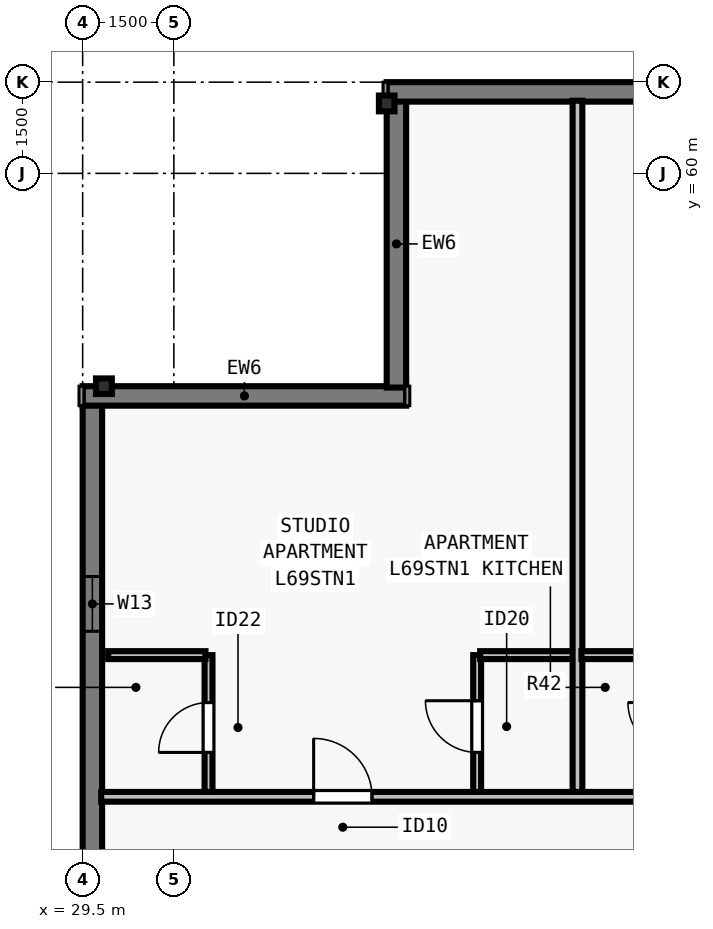
"""IFC4 building model, lengths in metres.
Left out: names, types, materials, properties, quantities, classifications, styles, units other than length and angle.
Written with IfcOpenShell. Run it as: python <this file> out.ifc"""

import sys

from ifc_helpers import new_model, si_unit, direction, frame, frame_2d, origin, origin_2d, place, context, subcontext, project, spatial, rectangle, i_section, extrude, element, fill, save


model = new_model("IFC4")
c1 = context("Model", 3, precision=1e-05, world=origin(), true_north=direction((0.0, 1.0)))
c2 = subcontext(c1, "Body", "Model", "MODEL_VIEW")
j1 = project(units=[si_unit("LENGTHUNIT", "METRE"), si_unit("PLANEANGLEUNIT", "RADIAN")], contexts=[c1])
p1 = place(None, origin())
s1 = spatial("IfcSite", under=j1, at=p1, CompositionType="ELEMENT")
p2 = place(p1, origin())
s2 = spatial("IfcBuilding", under=s1, at=p2, CompositionType="ELEMENT")
p3 = place(p2, frame((0.0, 0.0, 251.5)))
s3 = spatial("IfcBuildingStorey", under=s2, at=p3, CompositionType="ELEMENT", Elevation=251.5)
for number, where, z_axis, x_axis in (
    (1, (34.5, 61.15, 0.0), (0.0, 0.0, 1.0), (1.0, 0.0, 0.0)),
    (2, (29.85, 56.5, 0.0), (0.0, 0.0, 1.0), (0.0, 1.0, 0.0)),
):
    element("IfcColumn", number, at=place(p3, frame(where, z_axis=z_axis, x_axis=x_axis)), inside=s3, PredefinedType="COLUMN", context=c2, shape_type="SweptSolid", body=[
        extrude(i_section(OverallWidth=0.256, OverallDepth=0.26, WebThickness=0.01, FlangeThickness=0.017, FilletRadius=0.013, at=origin_2d()), origin(), (0.0, 0.0, 1.0), 3.5),
    ])
p4 = place(p3, frame((29.66, 32.8, 0.0), z_axis=(0.0, 0.0, 1.0), x_axis=(0.0, 1.0, 0.0)))
e3 = element("IfcWall", 3, at=p4, inside=s3, PredefinedType="SOLIDWALL", context=c2, shape_type="SweptSolid", body=[
    extrude(rectangle(XDim=23.402, YDim=0.32, at=frame_2d((11.701, 0.0))), origin(), (0.0, 0.0, 1.0), 3.29),
])
p5 = place(p4, frame((2.155, 0.0, 0.8)))
e4 = element("IfcOpeningElement", 4, at=p5, cuts=e3, PredefinedType="OPENING", context=c2, shape_type="SweptSolid", body=[
    extrude(rectangle(XDim=1.85, YDim=1.678, at=frame_2d((0.925, 0.839))), frame((0.0, 0.17, 0.0), z_axis=(0.0, -1.0, 0.0), x_axis=(1.0, 0.0, 0.0)), (0.0, 0.0, 1.0), 0.34),
])
p6 = place(p4, frame((5.966, 0.0, 0.8)))
e5 = element("IfcOpeningElement", 5, at=p6, cuts=e3, PredefinedType="OPENING", context=c2, shape_type="SweptSolid", body=[
    extrude(rectangle(XDim=1.55, YDim=1.678, at=frame_2d((0.775, 0.839))), frame((0.0, 0.17, 0.0), z_axis=(0.0, -1.0, 0.0), x_axis=(1.0, 0.0, 0.0)), (0.0, 0.0, 1.0), 0.34),
])
p7 = place(p4, frame((12.836, 0.0, 0.8)))
e6 = element("IfcOpeningElement", 6, at=p7, cuts=e3, PredefinedType="OPENING", context=c2, shape_type="SweptSolid", body=[
    extrude(rectangle(XDim=1.55, YDim=1.678, at=frame_2d((0.775, 0.839))), frame((0.0, 0.17, 0.0), z_axis=(0.0, -1.0, 0.0), x_axis=(1.0, 0.0, 0.0)), (0.0, 0.0, 1.0), 0.34),
])
p8 = place(p4, frame((19.67, 0.0, 0.8)))
e7 = element("IfcOpeningElement", 7, at=p8, cuts=e3, PredefinedType="OPENING", context=c2, shape_type="SweptSolid", body=[
    extrude(rectangle(XDim=0.9, YDim=1.678, at=frame_2d((0.45, 0.839))), frame((0.0, 0.17, 0.0), z_axis=(0.0, -1.0, 0.0), x_axis=(1.0, 0.0, 0.0)), (0.0, 0.0, 1.0), 0.34),
])
p9 = place(p3, frame((29.5, 56.34, 0.0), z_axis=(0.0, 0.0, 1.0), x_axis=(1.0, 0.0, 0.0)))
e8 = element("IfcWall", 8, at=p9, inside=s3, PredefinedType="SOLIDWALL", context=c2, shape_type="SweptSolid", body=[
    extrude(rectangle(XDim=5.32, YDim=0.32, at=frame_2d((2.66, 0.0))), origin(), (0.0, 0.0, 1.0), 3.29),
])
p10 = place(p3, frame((34.66, 56.478, 0.0), z_axis=(0.0, 0.0, 1.0), x_axis=(0.0, 1.0, 0.0)))
e9 = element("IfcWall", 9, at=p10, inside=s3, PredefinedType="SOLIDWALL", context=c2, shape_type="SweptSolid", body=[
    extrude(rectangle(XDim=4.724, YDim=0.32, at=frame_2d((2.362, 0.0))), origin(), (0.0, 0.0, 1.0), 3.29),
])
p11 = place(p3, frame((34.5, 61.34, 0.0), z_axis=(0.0, 0.0, 1.0), x_axis=(1.0, 0.0, 0.0)))
e10 = element("IfcWall", 10, at=p11, inside=s3, PredefinedType="SOLIDWALL", context=c2, shape_type="SweptSolid", body=[
    extrude(rectangle(XDim=34.702, YDim=0.32, at=frame_2d((17.351, 0.0))), origin(), (0.0, 0.0, 1.0), 3.29),
])
p12 = place(p11, frame((4.613, 0.0, 0.8)))
e11 = element("IfcOpeningElement", 11, at=p12, cuts=e10, PredefinedType="OPENING", context=c2, shape_type="SweptSolid", body=[
    extrude(rectangle(XDim=1.85, YDim=1.678, at=frame_2d((0.925, 0.839))), frame((0.0, 0.17, 0.0), z_axis=(0.0, -1.0, 0.0), x_axis=(1.0, 0.0, 0.0)), (0.0, 0.0, 1.0), 0.34),
])
p13 = place(p11, frame((7.688, 0.0, 0.8)))
e12 = element("IfcOpeningElement", 12, at=p13, cuts=e10, PredefinedType="OPENING", context=c2, shape_type="SweptSolid", body=[
    extrude(rectangle(XDim=1.55, YDim=1.678, at=frame_2d((0.775, 0.839))), frame((0.0, 0.17, 0.0), z_axis=(0.0, -1.0, 0.0), x_axis=(1.0, 0.0, 0.0)), (0.0, 0.0, 1.0), 0.34),
])
p14 = place(p11, frame((14.888, 0.0, 0.8)))
e13 = element("IfcOpeningElement", 13, at=p14, cuts=e10, PredefinedType="OPENING", context=c2, shape_type="SweptSolid", body=[
    extrude(rectangle(XDim=1.55, YDim=1.678, at=frame_2d((0.775, 0.839))), frame((0.0, 0.17, 0.0), z_axis=(0.0, -1.0, 0.0), x_axis=(1.0, 0.0, 0.0)), (0.0, 0.0, 1.0), 0.34),
])
p15 = place(p11, frame((18.564, 0.0, 0.8)))
e14 = element("IfcOpeningElement", 14, at=p15, cuts=e10, PredefinedType="OPENING", context=c2, shape_type="SweptSolid", body=[
    extrude(rectangle(XDim=1.85, YDim=1.678, at=frame_2d((0.925, 0.839))), frame((0.0, 0.17, 0.0), z_axis=(0.0, -1.0, 0.0), x_axis=(1.0, 0.0, 0.0)), (0.0, 0.0, 1.0), 0.34),
])
p16 = place(p11, frame((25.314, 0.0, 0.8)))
e15 = element("IfcOpeningElement", 15, at=p16, cuts=e10, PredefinedType="OPENING", context=c2, shape_type="SweptSolid", body=[
    extrude(rectangle(XDim=1.85, YDim=1.678, at=frame_2d((0.925, 0.839))), frame((0.0, 0.17, 0.0), z_axis=(0.0, -1.0, 0.0), x_axis=(1.0, 0.0, 0.0)), (0.0, 0.0, 1.0), 0.34),
])
p17 = place(p11, frame((28.389, 0.0, 0.8)))
e16 = element("IfcOpeningElement", 16, at=p17, cuts=e10, PredefinedType="OPENING", context=c2, shape_type="SweptSolid", body=[
    extrude(rectangle(XDim=1.55, YDim=1.678, at=frame_2d((0.775, 0.839))), frame((0.0, 0.17, 0.0), z_axis=(0.0, -1.0, 0.0), x_axis=(1.0, 0.0, 0.0)), (0.0, 0.0, 1.0), 0.34),
])
p18 = place(p3, frame((29.805, 49.748, 0.0), z_axis=(0.0, 0.0, 1.0), x_axis=(1.0, 0.0, 0.0)))
e17 = element("IfcWall", 17, at=p18, inside=s3, PredefinedType="PARTITIONING", context=c2, shape_type="SweptSolid", body=[
    extrude(rectangle(XDim=44.39, YDim=0.16, at=frame_2d((22.195, 0.0))), origin(), (0.0, 0.0, 1.0), 2.958),
])
p19 = place(p18, frame((3.494, 0.0, 0.0)))
e18 = element("IfcOpeningElement", 18, at=p19, cuts=e17, PredefinedType="OPENING", context=c2, shape_type="SweptSolid", body=[
    extrude(rectangle(XDim=0.96, YDim=2.18, at=frame_2d((0.48, 1.09))), frame((0.0, 0.09, 0.0), z_axis=(0.0, -1.0, 0.0), x_axis=(1.0, 0.0, 0.0)), (0.0, 0.0, 1.0), 0.18),
])
p20 = place(p18, frame((10.73, 0.0, 0.0)))
e19 = element("IfcOpeningElement", 19, at=p20, cuts=e17, PredefinedType="OPENING", context=c2, shape_type="SweptSolid", body=[
    extrude(rectangle(XDim=0.96, YDim=2.18, at=frame_2d((0.48, 1.09))), frame((0.0, 0.09, 0.0), z_axis=(0.0, -1.0, 0.0), x_axis=(1.0, 0.0, 0.0)), (0.0, 0.0, 1.0), 0.18),
])
p21 = place(p18, frame((18.09, 0.0, 0.0)))
e20 = element("IfcOpeningElement", 20, at=p21, cuts=e17, PredefinedType="OPENING", context=c2, shape_type="SweptSolid", body=[
    extrude(rectangle(XDim=0.96, YDim=2.18, at=frame_2d((0.48, 1.09))), frame((0.0, 0.09, 0.0), z_axis=(0.0, -1.0, 0.0), x_axis=(1.0, 0.0, 0.0)), (0.0, 0.0, 1.0), 0.18),
])
p22 = place(p18, frame((25.45, 0.0, 0.0)))
e21 = element("IfcOpeningElement", 21, at=p22, cuts=e17, PredefinedType="OPENING", context=c2, shape_type="SweptSolid", body=[
    extrude(rectangle(XDim=0.96, YDim=2.18, at=frame_2d((0.48, 1.09))), frame((0.0, 0.09, 0.0), z_axis=(0.0, -1.0, 0.0), x_axis=(1.0, 0.0, 0.0)), (0.0, 0.0, 1.0), 0.18),
])
p23 = place(p18, frame((32.81, 0.0, 0.0)))
e22 = element("IfcOpeningElement", 22, at=p23, cuts=e17, PredefinedType="OPENING", context=c2, shape_type="SweptSolid", body=[
    extrude(rectangle(XDim=0.96, YDim=2.18, at=frame_2d((0.48, 1.09))), frame((0.0, 0.09, 0.0), z_axis=(0.0, -1.0, 0.0), x_axis=(1.0, 0.0, 0.0)), (0.0, 0.0, 1.0), 0.18),
])
p24 = place(p18, frame((40.294, 0.0, 0.0)))
e23 = element("IfcOpeningElement", 23, at=p24, cuts=e17, PredefinedType="OPENING", context=c2, shape_type="SweptSolid", body=[
    extrude(rectangle(XDim=0.96, YDim=2.18, at=frame_2d((0.48, 1.09))), frame((0.0, 0.09, 0.0), z_axis=(0.0, -1.0, 0.0), x_axis=(1.0, 0.0, 0.0)), (0.0, 0.0, 1.0), 0.18),
])
p25 = place(p3, frame((31.57, 49.827, 0.0), z_axis=(0.0, 0.0, 1.0), x_axis=(0.0, 1.0, 0.0)))
e24 = element("IfcWall", 24, at=p25, inside=s3, PredefinedType="PLUMBINGWALL", context=c2, shape_type="SweptSolid", body=[
    extrude(rectangle(XDim=2.25, YDim=0.13, at=frame_2d((1.125, 0.0))), origin(), (0.0, 0.0, 1.0), 3.29),
])
p26 = place(p25, frame((0.65, 0.0, 0.0)))
e25 = element("IfcOpeningElement", 25, at=p26, cuts=e24, PredefinedType="OPENING", context=c2, shape_type="SweptSolid", body=[
    extrude(rectangle(XDim=0.82, YDim=2.1, at=frame_2d((0.41, 1.05))), frame((0.0, 0.075, 0.0), z_axis=(0.0, -1.0, 0.0), x_axis=(1.0, 0.0, 0.0)), (0.0, 0.0, 1.0), 0.15),
])
p27 = place(p3, frame((29.92, 52.077, 0.0), z_axis=(0.0, 0.0, 1.0), x_axis=(1.0, 0.0, 0.0)))
e26 = element("IfcWall", 26, at=p27, inside=s3, PredefinedType="PLUMBINGWALL", context=c2, shape_type="SweptSolid", body=[
    extrude(rectangle(XDim=1.6, YDim=0.13, at=frame_2d((0.8, 0.0))), origin(), (0.0, 0.0, 1.0), 3.29),
])
p28 = place(p3, frame((35.988, 49.827, 0.0), z_axis=(0.0, 0.0, 1.0), x_axis=(0.0, 1.0, 0.0)))
e27 = element("IfcWall", 27, at=p28, inside=s3, PredefinedType="PLUMBINGWALL", context=c2, shape_type="SweptSolid", body=[
    extrude(rectangle(XDim=2.25, YDim=0.13, at=frame_2d((1.125, 0.0))), origin(), (0.0, 0.0, 1.0), 3.29),
])
p29 = place(p28, frame((0.65, 0.0, 0.0)))
e28 = element("IfcOpeningElement", 28, at=p29, cuts=e27, PredefinedType="OPENING", context=c2, shape_type="SweptSolid", body=[
    extrude(rectangle(XDim=0.85, YDim=2.1, at=frame_2d((0.425, 1.05))), frame((0.0, 0.075, 0.0), z_axis=(0.0, -1.0, 0.0), x_axis=(1.0, 0.0, 0.0)), (0.0, 0.0, 1.0), 0.15),
])
p30 = place(p3, frame((36.038, 52.077, 0.0), z_axis=(0.0, 0.0, 1.0), x_axis=(1.0, 0.0, 0.0)))
e29 = element("IfcWall", 29, at=p30, inside=s3, PredefinedType="PLUMBINGWALL", context=c2, shape_type="SweptSolid", body=[
    extrude(rectangle(XDim=1.6, YDim=0.13, at=frame_2d((0.8, 0.0))), origin(), (0.0, 0.0, 1.0), 2.958),
])
p31 = place(p3, frame((37.637, 49.827, 0.0), z_axis=(0.0, 0.0, 1.0), x_axis=(0.0, 1.0, 0.0)))
e30 = element("IfcWall", 30, at=p31, inside=s3, PredefinedType="PARTITIONING", context=c2, shape_type="SweptSolid", body=[
    extrude(rectangle(XDim=11.368, YDim=0.16, at=frame_2d((5.684, 0.0))), origin(), (0.0, 0.0, 1.0), 2.573),
])
p32 = place(p3, frame((37.702, 52.077, 0.0), z_axis=(0.0, 0.0, 1.0), x_axis=(1.0, 0.0, 0.0)))
e31 = element("IfcWall", 31, at=p32, inside=s3, PredefinedType="PLUMBINGWALL", context=c2, shape_type="SweptSolid", body=[
    extrude(rectangle(XDim=1.535, YDim=0.13, at=frame_2d((0.768, 0.0))), origin(), (0.0, 0.0, 1.0), 3.29),
])
p33 = place(p8, origin())
e32 = element("IfcWindow", 32, at=p33, inside=s3, PartitioningType="SINGLE_PANEL", PredefinedType="WINDOW", context=c2, shape_type="SweptSolid", body=[
    extrude(rectangle(XDim=0.9, YDim=1.678, at=frame_2d((0.45, 0.839))), frame((0.0, -0.04, 0.0), z_axis=(0.0, -1.0, 0.0), x_axis=(1.0, 0.0, 0.0)), (0.0, 0.0, 1.0), 0.06),
])
fill(e7, e32)
p34 = place(p26, origin())
e33 = element("IfcDoor", 33, at=p34, inside=s3, OperationType="SINGLE_SWING_LEFT", PredefinedType="DOOR", context=c2, shape_type="SweptSolid", body=[
    extrude(rectangle(XDim=0.82, YDim=2.1, at=frame_2d((0.41, 1.05))), frame((0.0, 0.025, 0.0), z_axis=(0.0, -1.0, 0.0), x_axis=(1.0, 0.0, 0.0)), (0.0, 0.0, 1.0), 0.05),
])
fill(e25, e33)
p35 = place(p29, origin())
e34 = element("IfcDoor", 34, at=p35, inside=s3, OperationType="SINGLE_SWING_RIGHT", PredefinedType="DOOR", context=c2, shape_type="SweptSolid", body=[
    extrude(rectangle(XDim=0.85, YDim=2.1, at=frame_2d((0.425, 1.05))), frame((0.0, 0.025, 0.0), z_axis=(0.0, -1.0, 0.0), x_axis=(1.0, 0.0, 0.0)), (0.0, 0.0, 1.0), 0.05),
])
fill(e28, e34)
p36 = place(p19, origin())
e35 = element("IfcDoor", 35, at=p36, inside=s3, OperationType="SINGLE_SWING_LEFT", PredefinedType="DOOR", context=c2, shape_type="SweptSolid", body=[
    extrude(rectangle(XDim=0.96, YDim=2.18, at=frame_2d((0.48, 1.09))), frame((0.0, 0.025, 0.0), z_axis=(0.0, -1.0, 0.0), x_axis=(1.0, 0.0, 0.0)), (0.0, 0.0, 1.0), 0.05),
])
fill(e18, e35)
save(model, sys.argv[1])
